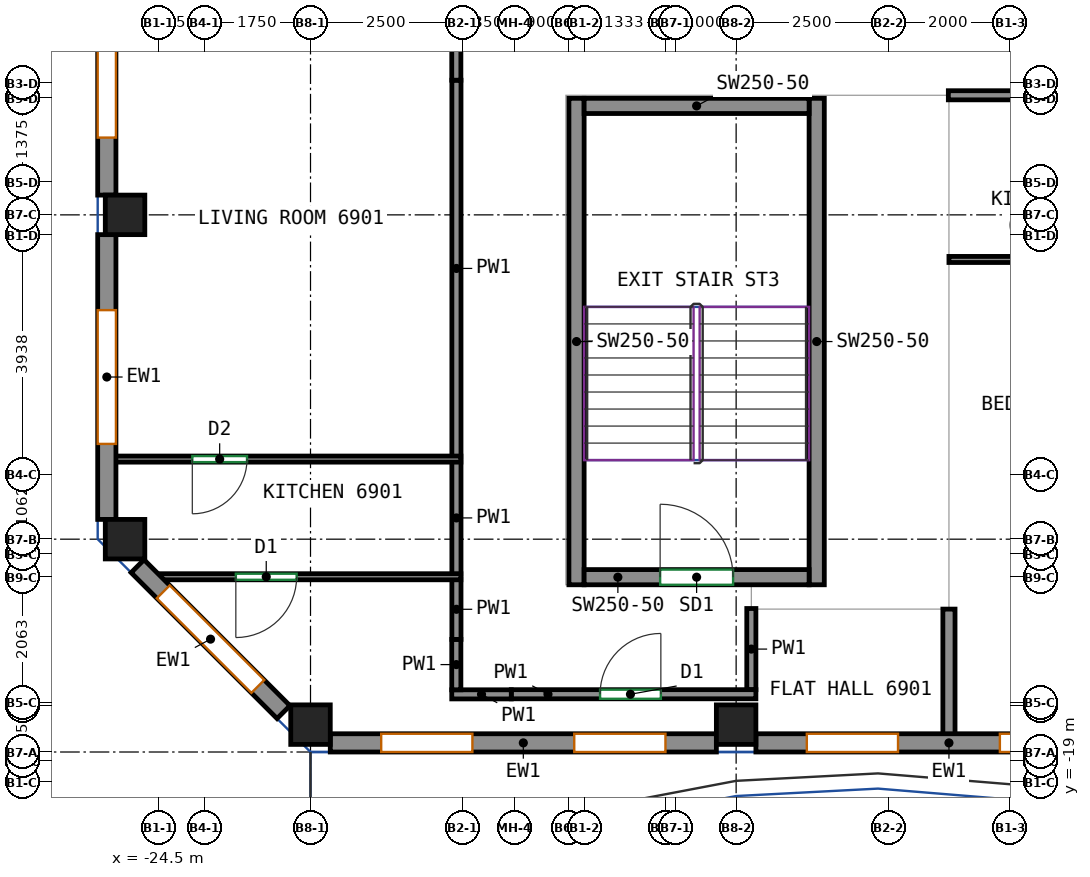
"""IFC4 building model, lengths in metres.
Left out: names, types, materials, properties, quantities, classifications, styles, units other than length and angle.
Written with IfcOpenShell. Run it as: python <this file> out.ifc"""

import sys

from ifc_helpers import new_model, si_unit, direction, frame, frame_2d, origin, origin_2d, place, context, subcontext, project, spatial, rectangle, extrude, source, transform, mapped, element, fill, save


model = new_model("IFC4")
c1 = context("Model", 3, precision=1e-05, world=origin(), true_north=direction((0.0, 1.0)))
c2 = subcontext(c1, "Body", "Model", "MODEL_VIEW")
j1 = project(units=[si_unit("LENGTHUNIT", "METRE"), si_unit("PLANEANGLEUNIT", "RADIAN")], contexts=[c1])
p1 = place(None, origin())
s1 = spatial("IfcSite", under=j1, at=p1, CompositionType="ELEMENT")
p2 = place(p1, origin())
s2 = spatial("IfcBuilding", under=s1, at=p2, CompositionType="ELEMENT")
p3 = place(p2, frame((0.0, 0.0, 280.6)))
s3 = spatial("IfcBuildingStorey", under=s2, at=p3, CompositionType="ELEMENT", Elevation=280.6)
m1 = source(origin(), c2, "Body", "SweptSolid", [
    extrude(rectangle(XDim=0.65, YDim=0.65, at=origin_2d()), origin(), (0.0, 0.0, 1.0), 3.12),
])
for number, where, z_axis, x_axis in (
    (1, (-25.05, -15.0, 0.0), (0.0, 0.0, 1.0), (1.0, 0.0, 0.0)),
    (2, (-25.05, -9.667, 0.0), (0.0, 0.0, 1.0), (1.0, 0.0, 0.0)),
    (3, (-22.0, -18.05, 0.0), (0.0, 0.0, 1.0), (1.0, 0.0, 0.0)),
    (4, (-15.0, -18.05, 0.0), (0.0, 0.0, 1.0), (1.0, 0.0, 0.0)),
):
    element("IfcColumn", number, at=place(p3, frame(where, z_axis=z_axis, x_axis=x_axis)), inside=s3, PredefinedType="COLUMN", context=c2, shape_type="MappedRepresentation", body=[
        mapped(m1, transform((0.0, 0.0, 0.0))),
    ])
m2 = source(origin(), c2, "Body", "SweptSolid", [
    extrude(rectangle(XDim=8.0, YDim=0.25, at=frame_2d((4.0, 0.0))), origin(), (0.0, 0.0, 1.0), 3.12),
])
for number, where, z_axis, x_axis in (
    (5, (-17.625, -15.75, 0.0), (0.0, 0.0, 1.0), (0.0, 1.0, 0.0)),
    (6, (-13.675, -15.75, 0.0), (0.0, 0.0, 1.0), (0.0, 1.0, 0.0)),
):
    element("IfcWall", number, at=place(p3, frame(where, z_axis=z_axis, x_axis=x_axis)), inside=s3, PredefinedType="SHEAR", context=c2, shape_type="MappedRepresentation", body=[
        mapped(m2, transform((0.0, 0.0, 0.0))),
    ])
m3 = source(origin(), c2, "Body", "SweptSolid", [
    extrude(rectangle(XDim=3.7, YDim=0.25, at=frame_2d((1.85, 0.0))), origin(), (0.0, 0.0, 1.0), 3.12),
])
p4 = place(p3, frame((-17.5, -15.625, 0.0), z_axis=(0.0, 0.0, 1.0), x_axis=(1.0, 0.0, 0.0)))
e7 = element("IfcWall", 7, at=p4, inside=s3, PredefinedType="SHEAR", context=c2, shape_type="MappedRepresentation", body=[
    mapped(m3, transform((0.0, 0.0, 0.0))),
])
p5 = place(p4, frame((1.25, 0.0, 0.0)))
e8 = element("IfcOpeningElement", 8, at=p5, cuts=e7, PredefinedType="OPENING", context=c2, shape_type="SweptSolid", body=[
    extrude(rectangle(XDim=1.2, YDim=2.1, at=frame_2d((0.6, 1.05))), frame((0.0, 0.135, 0.0), z_axis=(0.0, -1.0, 0.0), x_axis=(1.0, 0.0, 0.0)), (0.0, 0.0, 1.0), 0.27),
])
p6 = place(p3, frame((-17.5, -7.875, 0.0), z_axis=(0.0, 0.0, 1.0), x_axis=(1.0, 0.0, 0.0)))
e9 = element("IfcWall", 9, at=p6, inside=s3, PredefinedType="SHEAR", context=c2, shape_type="MappedRepresentation", body=[
    mapped(m3, transform((0.0, 0.0, 0.0))),
])
m4 = source(origin(), c2, "Body", "SweptSolid", [
    extrude(rectangle(XDim=6.35, YDim=0.3, at=frame_2d((3.175, 0.0))), origin(), (0.0, 0.0, 1.0), 3.12),
])
p7 = place(p3, frame((-21.675, -18.35, 0.0), z_axis=(0.0, 0.0, 1.0), x_axis=(1.0, 0.0, 0.0)))
e10 = element("IfcWall", 10, at=p7, inside=s3, PredefinedType="SOLIDWALL", context=c2, shape_type="MappedRepresentation", body=[
    mapped(m4, transform((0.0, 0.0, 0.0))),
])
p8 = place(p7, frame((0.837, 0.0, 0.8)))
e11 = element("IfcOpeningElement", 11, at=p8, cuts=e10, PredefinedType="OPENING", context=c2, shape_type="SweptSolid", body=[
    extrude(rectangle(XDim=1.5, YDim=2.05, at=frame_2d((0.75, 1.025))), frame((0.0, 0.16, 0.0), z_axis=(0.0, -1.0, 0.0), x_axis=(1.0, 0.0, 0.0)), (0.0, 0.0, 1.0), 0.32),
])
p9 = place(p7, frame((4.012, 0.0, 0.8)))
e12 = element("IfcOpeningElement", 12, at=p9, cuts=e10, PredefinedType="OPENING", context=c2, shape_type="SweptSolid", body=[
    extrude(rectangle(XDim=1.5, YDim=2.05, at=frame_2d((0.75, 1.025))), frame((0.0, 0.16, 0.0), z_axis=(0.0, -1.0, 0.0), x_axis=(1.0, 0.0, 0.0)), (0.0, 0.0, 1.0), 0.32),
])
p10 = place(p3, frame((-14.675, -18.35, 0.0), z_axis=(0.0, 0.0, 1.0), x_axis=(1.0, 0.0, 0.0)))
e13 = element("IfcWall", 13, at=p10, inside=s3, PredefinedType="SOLIDWALL", context=c2, shape_type="MappedRepresentation", body=[
    mapped(m4, transform((0.0, 0.0, 0.0))),
])
p11 = place(p10, frame((0.837, 0.0, 0.8)))
e14 = element("IfcOpeningElement", 14, at=p11, cuts=e13, PredefinedType="OPENING", context=c2, shape_type="SweptSolid", body=[
    extrude(rectangle(XDim=1.5, YDim=2.05, at=frame_2d((0.75, 1.025))), frame((0.0, 0.16, 0.0), z_axis=(0.0, -1.0, 0.0), x_axis=(1.0, 0.0, 0.0)), (0.0, 0.0, 1.0), 0.32),
])
p12 = place(p10, frame((4.012, 0.0, 0.8)))
e15 = element("IfcOpeningElement", 15, at=p12, cuts=e13, PredefinedType="OPENING", context=c2, shape_type="SweptSolid", body=[
    extrude(rectangle(XDim=1.5, YDim=2.05, at=frame_2d((0.75, 1.025))), frame((0.0, 0.16, 0.0), z_axis=(0.0, -1.0, 0.0), x_axis=(1.0, 0.0, 0.0)), (0.0, 0.0, 1.0), 0.32),
])
m5 = source(origin(), c2, "Body", "SweptSolid", [
    extrude(rectangle(XDim=8.184, YDim=0.3, at=frame_2d((4.092, 0.0))), origin(), (0.0, 0.0, 1.0), 3.12),
])
p13 = place(p3, frame((-25.35, -1.158, 0.0), z_axis=(0.0, 0.0, 1.0), x_axis=(0.0, -1.0, 0.0)))
e16 = element("IfcWall", 16, at=p13, inside=s3, PredefinedType="SOLIDWALL", context=c2, shape_type="MappedRepresentation", body=[
    mapped(m5, transform((0.0, 0.0, 0.0))),
])
p14 = place(p13, frame((0.946, 0.0, 0.8)))
e17 = element("IfcOpeningElement", 17, at=p14, cuts=e16, PredefinedType="OPENING", context=c2, shape_type="SweptSolid", body=[
    extrude(rectangle(XDim=2.2, YDim=2.05, at=frame_2d((1.1, 1.025))), frame((0.0, 0.16, 0.0), z_axis=(0.0, -1.0, 0.0), x_axis=(1.0, 0.0, 0.0)), (0.0, 0.0, 1.0), 0.32),
])
p15 = place(p13, frame((5.038, 0.0, 0.8)))
e18 = element("IfcOpeningElement", 18, at=p15, cuts=e16, PredefinedType="OPENING", context=c2, shape_type="SweptSolid", body=[
    extrude(rectangle(XDim=2.2, YDim=2.05, at=frame_2d((1.1, 1.025))), frame((0.0, 0.16, 0.0), z_axis=(0.0, -1.0, 0.0), x_axis=(1.0, 0.0, 0.0)), (0.0, 0.0, 1.0), 0.32),
])
m6 = source(origin(), c2, "Body", "SweptSolid", [
    extrude(rectangle(XDim=4.683, YDim=0.3, at=frame_2d((2.342, 0.0))), origin(), (0.0, 0.0, 1.0), 3.12),
])
p16 = place(p3, frame((-25.35, -9.992, 0.0), z_axis=(0.0, 0.0, 1.0), x_axis=(0.0, -1.0, 0.0)))
e19 = element("IfcWall", 19, at=p16, inside=s3, PredefinedType="SOLIDWALL", context=c2, shape_type="MappedRepresentation", body=[
    mapped(m6, transform((0.0, 0.0, 0.0))),
])
p17 = place(p16, frame((1.242, 0.0, 0.8)))
e20 = element("IfcOpeningElement", 20, at=p17, cuts=e19, PredefinedType="OPENING", context=c2, shape_type="SweptSolid", body=[
    extrude(rectangle(XDim=2.2, YDim=2.05, at=frame_2d((1.1, 1.025))), frame((0.0, 0.16, 0.0), z_axis=(0.0, -1.0, 0.0), x_axis=(1.0, 0.0, 0.0)), (0.0, 0.0, 1.0), 0.32),
])
m7 = source(origin(), c2, "Body", "SweptSolid", [
    extrude(rectangle(XDim=3.394, YDim=0.3, at=frame_2d((1.697, 0.0))), origin(), (0.0, 0.0, 1.0), 3.12),
])
p18 = place(p3, frame((-24.844, -15.444, 0.0), z_axis=(0.0, 0.0, 1.0), x_axis=(0.707070815327, -0.707142745217, 0.0)))
e21 = element("IfcWall", 21, at=p18, inside=s3, PredefinedType="SOLIDWALL", context=c2, shape_type="MappedRepresentation", body=[
    mapped(m7, transform((0.0, 0.0, 0.0))),
])
p19 = place(p18, frame((0.597, 0.0, 0.8)))
e22 = element("IfcOpeningElement", 22, at=p19, cuts=e21, PredefinedType="OPENING", context=c2, shape_type="SweptSolid", body=[
    extrude(rectangle(XDim=2.2, YDim=2.05, at=frame_2d((1.1, 1.025))), frame((0.0, 0.16, 0.0), z_axis=(0.0, -1.0, 0.0), x_axis=(1.0, 0.0, 0.0)), (0.0, 0.0, 1.0), 0.32),
])
p20 = place(p3, frame((-14.75, -17.475, 0.0), z_axis=(0.0, 0.0, 1.0), x_axis=(0.0, 1.0, 0.0)))
e23 = element("IfcWall", 23, at=p20, inside=s3, PredefinedType="PARTITIONING", context=c2, shape_type="SweptSolid", body=[
    extrude(rectangle(XDim=1.335, YDim=0.15, at=frame_2d((0.667, 0.0))), origin(), (0.0, 0.0, 1.0), 3.12),
])
p21 = place(p3, frame((-18.698, -17.55, 0.0), z_axis=(0.0, 0.0, 1.0), x_axis=(1.0, 0.0, 0.0)))
e24 = element("IfcWall", 24, at=p21, inside=s3, PredefinedType="PARTITIONING", context=c2, shape_type="SweptSolid", body=[
    extrude(rectangle(XDim=4.023, YDim=0.15, at=frame_2d((2.011, 0.0))), origin(), (0.0, 0.0, 1.0), 3.12),
])
p22 = place(p21, frame((1.46, 0.0, 0.0)))
e25 = element("IfcOpeningElement", 25, at=p22, cuts=e24, PredefinedType="OPENING", context=c2, shape_type="SweptSolid", body=[
    extrude(rectangle(XDim=1.0, YDim=2.1, at=frame_2d((0.5, 1.05))), frame((0.0, 0.085, 0.0), z_axis=(0.0, -1.0, 0.0), x_axis=(1.0, 0.0, 0.0)), (0.0, 0.0, 1.0), 0.17),
])
p23 = place(p3, frame((-19.677, -17.552, 0.0), z_axis=(0.0, 0.0, 1.0), x_axis=(1.0, 0.0, 0.0)))
e26 = element("IfcWall", 26, at=p23, inside=s3, PredefinedType="PARTITIONING", context=c2, shape_type="SweptSolid", body=[
    extrude(rectangle(XDim=0.979, YDim=0.15, at=frame_2d((0.49, 0.0))), origin(), (0.0, 0.0, 1.0), 3.12),
])
p24 = place(p3, frame((-19.602, -17.477, 0.0), z_axis=(0.0, 0.0, 1.0), x_axis=(0.0, 1.0, 0.0)))
e27 = element("IfcWall", 27, at=p24, inside=s3, PredefinedType="PARTITIONING", context=c2, shape_type="SweptSolid", body=[
    extrude(rectangle(XDim=0.829, YDim=0.15, at=frame_2d((0.415, 0.0))), origin(), (0.0, 0.0, 1.0), 3.12),
])
p25 = place(p3, frame((-19.6, -16.648, 0.0), z_axis=(0.0, 0.0, 1.0), x_axis=(0.0, 1.0, 0.0)))
e28 = element("IfcWall", 28, at=p25, inside=s3, PredefinedType="PARTITIONING", context=c2, shape_type="SweptSolid", body=[
    extrude(rectangle(XDim=0.99, YDim=0.15, at=frame_2d((0.495, 0.0))), origin(), (0.0, 0.0, 1.0), 3.12),
])
p26 = place(p3, frame((-19.6, -15.578, 0.0), z_axis=(0.0, 0.0, 1.0), x_axis=(0.0, 1.0, 0.0)))
e29 = element("IfcWall", 29, at=p26, inside=s3, PredefinedType="PARTITIONING", context=c2, shape_type="SweptSolid", body=[
    extrude(rectangle(XDim=1.855, YDim=0.15, at=frame_2d((0.927, 0.0))), origin(), (0.0, 0.0, 1.0), 3.12),
])
p27 = place(p3, frame((-19.6, -13.643, 0.0), z_axis=(0.0, 0.0, 1.0), x_axis=(0.0, 1.0, 0.0)))
e30 = element("IfcWall", 30, at=p27, inside=s3, PredefinedType="PARTITIONING", context=c2, shape_type="SweptSolid", body=[
    extrude(rectangle(XDim=6.191, YDim=0.15, at=frame_2d((3.096, 0.0))), origin(), (0.0, 0.0, 1.0), 3.12),
])
p28 = place(p3, frame((-19.602, -7.452, 0.0), z_axis=(0.0, 0.0, 1.0), x_axis=(0.0, 1.0, 0.0)))
e31 = element("IfcWall", 31, at=p28, inside=s3, PredefinedType="PARTITIONING", context=c2, shape_type="SweptSolid", body=[
    extrude(rectangle(XDim=1.381, YDim=0.15, at=frame_2d((0.69, 0.0))), origin(), (0.0, 0.0, 1.0), 3.12),
])
p29 = place(p3, frame((-11.51, -7.7, 0.0), z_axis=(0.0, 0.0, 1.0), x_axis=(1.0, 0.0, 0.0)))
e32 = element("IfcWall", 32, at=p29, inside=s3, PredefinedType="PARTITIONING", context=c2, shape_type="SweptSolid", body=[
    extrude(rectangle(XDim=21.02, YDim=0.15, at=frame_2d((10.51, 0.0))), origin(), (0.0, 0.0, 1.0), 3.12),
])
p30 = place(p29, frame((3.24, 0.0, 0.0)))
e33 = element("IfcOpeningElement", 33, at=p30, cuts=e32, PredefinedType="OPENING", context=c2, shape_type="SweptSolid", body=[
    extrude(rectangle(XDim=1.0, YDim=2.1, at=frame_2d((0.5, 1.05))), frame((0.0, 0.085, 0.0), z_axis=(0.0, -1.0, 0.0), x_axis=(1.0, 0.0, 0.0)), (0.0, 0.0, 1.0), 0.17),
])
p31 = place(p29, frame((14.321, 0.0, 0.0)))
e34 = element("IfcOpeningElement", 34, at=p31, cuts=e32, PredefinedType="OPENING", context=c2, shape_type="SweptSolid", body=[
    extrude(rectangle(XDim=1.0, YDim=2.1, at=frame_2d((0.5, 1.05))), frame((0.0, 0.085, 0.0), z_axis=(0.0, -1.0, 0.0), x_axis=(1.0, 0.0, 0.0)), (0.0, 0.0, 1.0), 0.17),
])
p32 = place(p3, frame((-19.527, -15.618, 0.0), z_axis=(0.0, 0.0, 1.0), x_axis=(-1.0, 0.0, 0.0)))
e35 = element("IfcWall", 35, at=p32, inside=s3, PredefinedType="PARTITIONING", context=c2, shape_type="SweptSolid", body=[
    extrude(rectangle(XDim=5.001, YDim=0.1, at=frame_2d((2.5, 0.0))), origin(), (0.0, 0.0, 1.0), 3.12),
])
p33 = place(p32, frame((2.701, 0.0, 0.0)))
e36 = element("IfcOpeningElement", 36, at=p33, cuts=e35, PredefinedType="OPENING", context=c2, shape_type="SweptSolid", body=[
    extrude(rectangle(XDim=1.0, YDim=2.1, at=frame_2d((0.5, 1.05))), frame((0.0, 0.06, 0.0), z_axis=(0.0, -1.0, 0.0), x_axis=(1.0, 0.0, 0.0)), (0.0, 0.0, 1.0), 0.12),
])
p34 = place(p3, frame((-11.5, -18.25, 0.0), z_axis=(0.0, 0.0, 1.0), x_axis=(0.0, 1.0, 0.0)))
e37 = element("IfcWall", 37, at=p34, inside=s3, PredefinedType="PARTITIONING", context=c2, shape_type="SweptSolid", body=[
    extrude(rectangle(XDim=2.1, YDim=0.2, at=frame_2d((1.05, 0.0))), origin(), (0.0, 0.0, 1.0), 3.12),
])
p35 = place(p3, frame((-19.527, -13.683, 0.0), z_axis=(0.0, 0.0, 1.0), x_axis=(-1.0, 0.0, 0.0)))
e38 = element("IfcWall", 38, at=p35, inside=s3, PredefinedType="PARTITIONING", context=c2, shape_type="SweptSolid", body=[
    extrude(rectangle(XDim=5.723, YDim=0.1, at=frame_2d((2.861, 0.0))), origin(), (0.0, 0.0, 1.0), 3.12),
])
p36 = place(p35, frame((3.517, 0.0, 0.0)))
e39 = element("IfcOpeningElement", 39, at=p36, cuts=e38, PredefinedType="OPENING", context=c2, shape_type="SweptSolid", body=[
    extrude(rectangle(XDim=0.9, YDim=2.1, at=frame_2d((0.45, 1.05))), frame((0.0, 0.06, 0.0), z_axis=(0.0, -1.0, 0.0), x_axis=(1.0, 0.0, 0.0)), (0.0, 0.0, 1.0), 0.12),
])
p37 = place(p3, frame((-11.5, -10.4, 0.0), z_axis=(0.0, 0.0, 1.0), x_axis=(1.0, 0.0, 0.0)))
e40 = element("IfcWall", 40, at=p37, inside=s3, PredefinedType="PARTITIONING", context=c2, shape_type="SweptSolid", body=[
    extrude(rectangle(XDim=21.1, YDim=0.1, at=frame_2d((10.55, 0.0))), origin(), (0.0, 0.0, 1.0), 3.12),
])
p38 = place(p37, frame((4.05, 0.0, 0.0)))
e41 = element("IfcOpeningElement", 41, at=p38, cuts=e40, PredefinedType="OPENING", context=c2, shape_type="SweptSolid", body=[
    extrude(rectangle(XDim=1.0, YDim=2.1, at=frame_2d((0.5, 1.05))), frame((0.0, 0.06, 0.0), z_axis=(0.0, -1.0, 0.0), x_axis=(1.0, 0.0, 0.0)), (0.0, 0.0, 1.0), 0.12),
])
p39 = place(p37, frame((11.727, 0.0, 0.0)))
e42 = element("IfcOpeningElement", 42, at=p39, cuts=e40, PredefinedType="OPENING", context=c2, shape_type="SweptSolid", body=[
    extrude(rectangle(XDim=0.9, YDim=2.1, at=frame_2d((0.45, 1.05))), frame((0.0, 0.06, 0.0), z_axis=(0.0, -1.0, 0.0), x_axis=(1.0, 0.0, 0.0)), (0.0, 0.0, 1.0), 0.12),
])
p40 = place(p37, frame((15.225, 0.0, 0.0)))
e43 = element("IfcOpeningElement", 43, at=p40, cuts=e40, PredefinedType="OPENING", context=c2, shape_type="SweptSolid", body=[
    extrude(rectangle(XDim=1.0, YDim=2.1, at=frame_2d((0.5, 1.05))), frame((0.0, 0.06, 0.0), z_axis=(0.0, -1.0, 0.0), x_axis=(1.0, 0.0, 0.0)), (0.0, 0.0, 1.0), 0.12),
])
p41 = place(p8, origin())
e44 = element("IfcWindow", 44, at=p41, inside=s3, PartitioningType="SINGLE_PANEL", PredefinedType="WINDOW", context=c2, shape_type="SweptSolid", body=[
    extrude(rectangle(XDim=1.5, YDim=2.05, at=frame_2d((0.75, 1.025))), frame((0.0, 0.03, 0.0), z_axis=(0.0, -1.0, 0.0), x_axis=(1.0, 0.0, 0.0)), (0.0, 0.0, 1.0), 0.06),
])
fill(e11, e44)
p42 = place(p9, origin())
e45 = element("IfcWindow", 45, at=p42, inside=s3, PartitioningType="SINGLE_PANEL", PredefinedType="WINDOW", context=c2, shape_type="SweptSolid", body=[
    extrude(rectangle(XDim=1.5, YDim=2.05, at=frame_2d((0.75, 1.025))), frame((0.0, 0.03, 0.0), z_axis=(0.0, -1.0, 0.0), x_axis=(1.0, 0.0, 0.0)), (0.0, 0.0, 1.0), 0.06),
])
fill(e12, e45)
p43 = place(p11, origin())
e46 = element("IfcWindow", 46, at=p43, inside=s3, PartitioningType="SINGLE_PANEL", PredefinedType="WINDOW", context=c2, shape_type="SweptSolid", body=[
    extrude(rectangle(XDim=1.5, YDim=2.05, at=frame_2d((0.75, 1.025))), frame((0.0, 0.03, 0.0), z_axis=(0.0, -1.0, 0.0), x_axis=(1.0, 0.0, 0.0)), (0.0, 0.0, 1.0), 0.06),
])
fill(e14, e46)
p44 = place(p12, origin())
e47 = element("IfcWindow", 47, at=p44, inside=s3, PartitioningType="SINGLE_PANEL", PredefinedType="WINDOW", context=c2, shape_type="SweptSolid", body=[
    extrude(rectangle(XDim=1.5, YDim=2.05, at=frame_2d((0.75, 1.025))), frame((0.0, 0.03, 0.0), z_axis=(0.0, -1.0, 0.0), x_axis=(1.0, 0.0, 0.0)), (0.0, 0.0, 1.0), 0.06),
])
fill(e15, e47)
p45 = place(p15, origin())
e48 = element("IfcWindow", 48, at=p45, inside=s3, PartitioningType="SINGLE_PANEL", PredefinedType="WINDOW", context=c2, shape_type="SweptSolid", body=[
    extrude(rectangle(XDim=2.2, YDim=2.05, at=frame_2d((1.1, 1.025))), frame((0.0, 0.03, 0.0), z_axis=(0.0, -1.0, 0.0), x_axis=(1.0, 0.0, 0.0)), (0.0, 0.0, 1.0), 0.06),
])
fill(e18, e48)
p46 = place(p17, origin())
e49 = element("IfcWindow", 49, at=p46, inside=s3, PartitioningType="SINGLE_PANEL", PredefinedType="WINDOW", context=c2, shape_type="SweptSolid", body=[
    extrude(rectangle(XDim=2.2, YDim=2.05, at=frame_2d((1.1, 1.025))), frame((0.0, 0.03, 0.0), z_axis=(0.0, -1.0, 0.0), x_axis=(1.0, 0.0, 0.0)), (0.0, 0.0, 1.0), 0.06),
])
fill(e20, e49)
p47 = place(p19, origin())
e50 = element("IfcWindow", 50, at=p47, inside=s3, PartitioningType="SINGLE_PANEL", PredefinedType="WINDOW", context=c2, shape_type="SweptSolid", body=[
    extrude(rectangle(XDim=2.2, YDim=2.05, at=frame_2d((1.1, 1.025))), frame((0.0, 0.03, 0.0), z_axis=(0.0, -1.0, 0.0), x_axis=(1.0, 0.0, 0.0)), (0.0, 0.0, 1.0), 0.06),
])
fill(e22, e50)
p48 = place(p5, origin())
e51 = element("IfcDoor", 51, at=p48, inside=s3, OperationType="DOUBLE_DOOR_SINGLE_SWING", PredefinedType="DOOR", context=c2, shape_type="SweptSolid", body=[
    extrude(rectangle(XDim=1.2, YDim=2.1, at=frame_2d((0.6, 1.05))), frame((0.0, 0.025, 0.0), z_axis=(0.0, -1.0, 0.0), x_axis=(1.0, 0.0, 0.0)), (0.0, 0.0, 1.0), 0.05),
])
fill(e8, e51)
p49 = place(p22, origin())
e52 = element("IfcDoor", 52, at=p49, inside=s3, OperationType="SINGLE_SWING_RIGHT", PredefinedType="DOOR", context=c2, shape_type="SweptSolid", body=[
    extrude(rectangle(XDim=1.0, YDim=2.1, at=frame_2d((0.5, 1.05))), frame((0.0, 0.025, 0.0), z_axis=(0.0, -1.0, 0.0), x_axis=(1.0, 0.0, 0.0)), (0.0, 0.0, 1.0), 0.05),
])
fill(e25, e52)
p50 = place(p33, origin())
e53 = element("IfcDoor", 53, at=p50, inside=s3, OperationType="SINGLE_SWING_RIGHT", PredefinedType="DOOR", context=c2, shape_type="SweptSolid", body=[
    extrude(rectangle(XDim=1.0, YDim=2.1, at=frame_2d((0.5, 1.05))), frame((0.0, 0.025, 0.0), z_axis=(0.0, -1.0, 0.0), x_axis=(1.0, 0.0, 0.0)), (0.0, 0.0, 1.0), 0.05),
])
fill(e36, e53)
p51 = place(p36, origin())
e54 = element("IfcDoor", 54, at=p51, inside=s3, OperationType="SINGLE_SWING_RIGHT", PredefinedType="DOOR", context=c2, shape_type="SweptSolid", body=[
    extrude(rectangle(XDim=0.9, YDim=2.1, at=frame_2d((0.45, 1.05))), frame((0.0, 0.025, 0.0), z_axis=(0.0, -1.0, 0.0), x_axis=(1.0, 0.0, 0.0)), (0.0, 0.0, 1.0), 0.05),
])
fill(e39, e54)
save(model, sys.argv[1])
